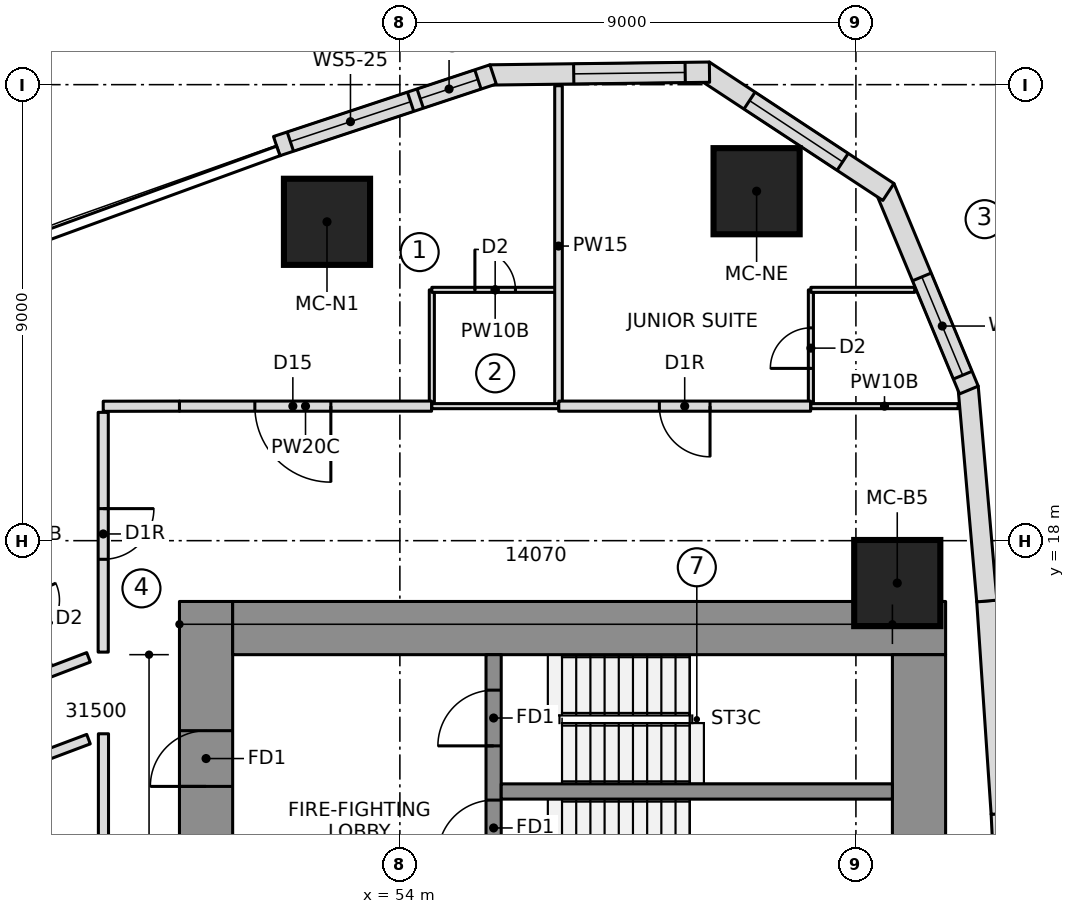
"""IFC4 building model, lengths in metres.
Left out: names, types, materials, properties, quantities, classifications, styles, units other than length and angle.
Written with IfcOpenShell. Run it as: python <this file> out.ifc"""

import sys

from ifc_helpers import new_model, si_unit, direction, frame, frame_2d, origin, origin_2d, place, context, subcontext, project, spatial, polyline, rectangle, outline, extrude, element, fill, save


model = new_model("IFC4")
c1 = context("Model", 3, precision=1e-05, world=origin(), true_north=direction((0.0, 1.0)))
c2 = subcontext(c1, "Body", "Model", "MODEL_VIEW")
j1 = project(units=[si_unit("LENGTHUNIT", "METRE"), si_unit("PLANEANGLEUNIT", "RADIAN")], contexts=[c1])
p1 = place(None, origin())
s1 = spatial("IfcSite", under=j1, at=p1, CompositionType="ELEMENT")
p2 = place(p1, origin())
s2 = spatial("IfcBuilding", under=s1, at=p2, CompositionType="ELEMENT")
p3 = place(p2, frame((0.0, 0.0, 102.65)))
s3 = spatial("IfcBuildingStorey", under=s2, at=p3, CompositionType="ELEMENT", Elevation=102.65)
p4 = place(p3, frame((50.175, 6.65, 0.0), z_axis=(0.0, 0.0, 1.0), x_axis=(0.0, 1.0, 0.0)))
e1 = element("IfcWall", 1, at=p4, inside=s3, PredefinedType="SHEAR", context=c2, shape_type="SweptSolid", body=[
    extrude(rectangle(XDim=10.15, YDim=1.05, at=frame_2d((5.075, 0.0))), origin(), (0.0, 0.0, 1.0), 3.55),
])
p5 = place(p4, frame((6.5, 0.0, 0.0)))
e2 = element("IfcOpeningElement", 2, at=p5, cuts=e1, PredefinedType="OPENING", context=c2, shape_type="SweptSolid", body=[
    extrude(rectangle(XDim=1.1, YDim=2.1, at=frame_2d((0.55, 1.05))), frame((0.0, 0.535, 0.0), z_axis=(0.0, -1.0, 0.0), x_axis=(1.0, 0.0, 0.0)), (0.0, 0.0, 1.0), 1.07),
])
p6 = place(p3, frame((50.7, 16.275, 0.0), z_axis=(0.0, 0.0, 1.0), x_axis=(1.0, 0.0, 0.0)))
e3 = element("IfcWall", 3, at=p6, inside=s3, PredefinedType="SHEAR", context=c2, shape_type="SweptSolid", body=[
    extrude(rectangle(XDim=14.07, YDim=1.05, at=frame_2d((7.035, 0.0))), origin(), (0.0, 0.0, 1.0), 3.55),
])
p7 = place(p3, frame((64.245, 9.389, 0.0), z_axis=(0.0, 0.0, 1.0), x_axis=(0.0, 1.0, 0.0)))
e4 = element("IfcWall", 4, at=p7, inside=s3, PredefinedType="SHEAR", context=c2, shape_type="SweptSolid", body=[
    extrude(rectangle(XDim=6.361, YDim=1.05, at=frame_2d((3.181, 0.0))), origin(), (0.0, 0.0, 1.0), 3.55),
])
p8 = place(p3, frame((55.85, 10.35, 0.0), z_axis=(0.0, 0.0, 1.0), x_axis=(0.0, 1.0, 0.0)))
e5 = element("IfcWall", 5, at=p8, inside=s3, PredefinedType="SHEAR", context=c2, shape_type="SweptSolid", body=[
    extrude(rectangle(XDim=5.4, YDim=0.3, at=frame_2d((2.7, 0.0))), origin(), (0.0, 0.0, 1.0), 3.55),
])
p9 = place(p8, frame((1.43, 0.0, 0.0)))
e6 = element("IfcOpeningElement", 6, at=p9, cuts=e5, PredefinedType="OPENING", context=c2, shape_type="SweptSolid", body=[
    extrude(rectangle(XDim=1.1, YDim=2.1, at=frame_2d((0.55, 1.05))), frame((0.0, 0.16, 0.0), z_axis=(0.0, -1.0, 0.0), x_axis=(1.0, 0.0, 0.0)), (0.0, 0.0, 1.0), 0.32),
])
p10 = place(p8, frame((3.6, 0.0, 0.0)))
e7 = element("IfcOpeningElement", 7, at=p10, cuts=e5, PredefinedType="OPENING", context=c2, shape_type="SweptSolid", body=[
    extrude(rectangle(XDim=1.1, YDim=2.1, at=frame_2d((0.55, 1.05))), frame((0.0, 0.16, 0.0), z_axis=(0.0, -1.0, 0.0), x_axis=(1.0, 0.0, 0.0)), (0.0, 0.0, 1.0), 0.32),
])
p11 = place(p3, frame((56.0, 13.05, 0.0), z_axis=(0.0, 0.0, 1.0), x_axis=(1.0, 0.0, 0.0)))
e8 = element("IfcWall", 8, at=p11, inside=s3, PredefinedType="SHEAR", context=c2, shape_type="SweptSolid", body=[
    extrude(rectangle(XDim=7.72, YDim=0.3, at=frame_2d((3.86, 0.0))), origin(), (0.0, 0.0, 1.0), 3.55),
])
for number, where, z_axis, x_axis in (
    (9, (63.816, 17.164, 0.0), (0.0, 0.0, 1.0), (1.0, 0.0, 0.0)),
    (10, (61.04, 24.897, 0.0), (0.0, 0.0, 1.0), (1.0, 0.0, 0.0)),
    (11, (52.562, 24.293, 0.0), (0.0, 0.0, 1.0), (1.0, 0.0, 0.0)),
):
    element("IfcColumn", number, at=place(p3, frame(where, z_axis=z_axis, x_axis=x_axis)), inside=s3, PredefinedType="COLUMN", context=c2, shape_type="SweptSolid", body=[
        extrude(rectangle(XDim=1.7, YDim=1.7, at=origin_2d()), origin(), (0.0, 0.0, 1.0), 3.55),
    ])
p12 = place(p3, frame((66.072, 8.412, 0.0), z_axis=(0.0, 0.0, 1.0), x_axis=(-0.048342691508, 0.998830808585, 0.0)))
e12 = element("IfcWall", 12, at=p12, inside=s3, PredefinedType="NOTDEFINED", context=c2, shape_type="SweptSolid", body=[
    extrude(outline(polyline([(-0.002, -0.2), (4.209, -0.2), (4.205, 0.2), (0.002, 0.2), (-0.002, -0.2)])), origin(), (0.0, 0.0, 1.0), 3.25),
])
p13 = place(p3, frame((65.868, 12.614, 0.0), z_axis=(0.0, 0.0, 1.0), x_axis=(-0.067724559895, 0.997704056315, 0.0)))
e13 = element("IfcWall", 13, at=p13, inside=s3, PredefinedType="NOTDEFINED", context=c2, shape_type="SweptSolid", body=[
    extrude(outline(polyline([(-0.002, -0.2), (4.209, -0.2), (4.205, 0.2), (0.002, 0.2), (-0.002, -0.2)])), origin(), (0.0, 0.0, 1.0), 3.25),
])
p14 = place(p3, frame((65.583, 16.811, 0.0), z_axis=(0.0, 0.0, 1.0), x_axis=(-0.086992730434, 0.996208946382, 0.0)))
e14 = element("IfcWall", 14, at=p14, inside=s3, PredefinedType="NOTDEFINED", context=c2, shape_type="SweptSolid", body=[
    extrude(outline(polyline([(-0.002, -0.2), (4.238, -0.2), (4.176, 0.2), (0.002, 0.2), (-0.002, -0.2)])), origin(), (0.0, 0.0, 1.0), 3.25),
])
p15 = place(p3, frame((65.217, 21.002, 0.0), z_axis=(0.0, 0.0, 1.0), x_axis=(-0.383997751971, 0.923334027577, 0.0)))
e15 = element("IfcWall", 15, at=p15, inside=s3, PredefinedType="NOTDEFINED", context=c2, shape_type="SweptSolid", body=[
    extrude(outline(polyline([(-0.031, -0.2), (4.3, -0.2), (4.177, 0.2), (0.031, 0.2), (-0.031, -0.2)])), origin(), (0.0, 0.0, 1.0), 3.25),
])
p16 = place(p15, frame((0.287, 0.0, 0.6)))
e16 = element("IfcOpeningElement", 16, at=p16, cuts=e15, PredefinedType="OPENING", context=c2, shape_type="SweptSolid", body=[
    extrude(outline(polyline([(0.0, 1.4), (0.08, 1.802), (0.308, 2.142), (0.648, 2.37), (1.05, 2.45), (1.452, 2.37), (1.792, 2.142), (2.02, 1.802), (2.1, 1.4), (2.1, 1.05), (2.02, 0.648), (1.792, 0.308), (1.452, 0.08), (1.05, 0.0), (0.648, 0.08), (0.308, 0.308), (0.08, 0.648), (0.0, 1.05), (0.0, 1.4)])), frame((0.0, 0.21, 0.0), z_axis=(0.0, -1.0, 0.0), x_axis=(1.0, 0.0, 0.0)), (0.0, 0.0, 1.0), 0.42),
])
p17 = place(p3, frame((63.59, 24.916, 0.0), z_axis=(0.0, 0.0, 1.0), x_axis=(-0.835340523653, 0.549732852887, 0.0)))
e17 = element("IfcWall", 17, at=p17, inside=s3, PredefinedType="NOTDEFINED", context=c2, shape_type="SweptSolid", body=[
    extrude(outline(polyline([(-0.061, -0.2), (4.3, -0.2), (4.178, 0.2), (0.061, 0.2), (-0.061, -0.2)])), origin(), (0.0, 0.0, 1.0), 3.25),
])
p18 = place(p17, frame((1.02, 0.0, 0.6)))
e18 = element("IfcOpeningElement", 18, at=p18, cuts=e17, PredefinedType="OPENING", context=c2, shape_type="SweptSolid", body=[
    extrude(outline(polyline([(0.0, 1.35), (0.084, 1.771), (0.322, 2.128), (0.679, 2.366), (1.1, 2.45), (1.521, 2.366), (1.878, 2.128), (2.116, 1.771), (2.2, 1.35), (2.2, 1.1), (2.116, 0.679), (1.878, 0.322), (1.521, 0.084), (1.1, 0.0), (0.679, 0.084), (0.322, 0.322), (0.084, 0.679), (0.0, 1.1), (0.0, 1.35)])), frame((0.0, 0.21, 0.0), z_axis=(0.0, -1.0, 0.0), x_axis=(1.0, 0.0, 0.0)), (0.0, 0.0, 1.0), 0.42),
])
p19 = place(p3, frame((60.049, 27.246, 0.0), z_axis=(0.0, 0.0, 1.0), x_axis=(-0.999919718849, -0.012671063772, 0.0)))
e19 = element("IfcWall", 19, at=p19, inside=s3, PredefinedType="NOTDEFINED", context=c2, shape_type="SweptSolid", body=[
    extrude(outline(polyline([(-0.061, -0.2), (4.27, -0.2), (4.208, 0.2), (0.061, 0.2), (-0.061, -0.2)])), origin(), (0.0, 0.0, 1.0), 3.25),
])
p20 = place(p19, frame((0.418, 0.0, 0.6)))
e20 = element("IfcOpeningElement", 20, at=p20, cuts=e19, PredefinedType="OPENING", context=c2, shape_type="SweptSolid", body=[
    extrude(outline(polyline([(0.0, 1.35), (0.084, 1.771), (0.322, 2.128), (0.679, 2.366), (1.1, 2.45), (1.521, 2.366), (1.878, 2.128), (2.116, 1.771), (2.2, 1.35), (2.2, 1.1), (2.116, 0.679), (1.878, 0.322), (1.521, 0.084), (1.1, 0.0), (0.679, 0.084), (0.322, 0.322), (0.084, 0.679), (0.0, 1.1), (0.0, 1.35)])), frame((0.0, 0.21, 0.0), z_axis=(0.0, -1.0, 0.0), x_axis=(1.0, 0.0, 0.0)), (0.0, 0.0, 1.0), 0.42),
])
p21 = place(p3, frame((55.81, 27.192, 0.0), z_axis=(0.0, 0.0, 1.0), x_axis=(-0.94925004851, -0.314522408429, 0.0)))
e21 = element("IfcWall", 21, at=p21, inside=s3, PredefinedType="NOTDEFINED", context=c2, shape_type="SweptSolid", body=[
    extrude(outline(polyline([(-0.031, -0.2), (4.468, -0.2), (4.468, 0.2), (0.031, 0.2), (-0.031, -0.2)])), origin(), (0.0, 0.0, 1.0), 3.25),
])
p22 = place(p21, frame((0.284, 0.0, 0.9)))
e22 = element("IfcOpeningElement", 22, at=p22, cuts=e21, PredefinedType="OPENING", context=c2, shape_type="SweptSolid", body=[
    extrude(rectangle(XDim=1.2, YDim=1.8, at=frame_2d((0.6, 0.9))), frame((0.0, 0.21, 0.0), z_axis=(0.0, -1.0, 0.0), x_axis=(1.0, 0.0, 0.0)), (0.0, 0.0, 1.0), 0.42),
])
p23 = place(p21, frame((1.684, 0.0, 0.9)))
e23 = element("IfcOpeningElement", 23, at=p23, cuts=e21, PredefinedType="OPENING", context=c2, shape_type="SweptSolid", body=[
    extrude(rectangle(XDim=2.5, YDim=1.8, at=frame_2d((1.25, 0.9))), frame((0.0, 0.21, 0.0), z_axis=(0.0, -1.0, 0.0), x_axis=(1.0, 0.0, 0.0)), (0.0, 0.0, 1.0), 0.42),
])
p24 = place(p3, frame((54.631, 20.65, 0.0), z_axis=(0.0, 0.0, 1.0), x_axis=(0.0, 1.0, 0.0)))
e24 = element("IfcWall", 24, at=p24, inside=s3, PredefinedType="PARTITIONING", context=c2, shape_type="SweptSolid", body=[
    extrude(rectangle(XDim=2.3, YDim=0.1, at=frame_2d((1.15, 0.0))), origin(), (0.0, 0.0, 1.0), 3.25),
])
p25 = place(p3, frame((54.631, 22.95, 0.0), z_axis=(0.0, 0.0, 1.0), x_axis=(1.0, 0.0, 0.0)))
e25 = element("IfcWall", 25, at=p25, inside=s3, PredefinedType="PARTITIONING", context=c2, shape_type="SweptSolid", body=[
    extrude(rectangle(XDim=2.5, YDim=0.1, at=frame_2d((1.25, 0.0))), origin(), (0.0, 0.0, 1.0), 3.25),
])
p26 = place(p25, frame((0.85, 0.0, 0.0)))
e26 = element("IfcOpeningElement", 26, at=p26, cuts=e25, PredefinedType="OPENING", context=c2, shape_type="SweptSolid", body=[
    extrude(rectangle(XDim=0.8, YDim=2.1, at=frame_2d((0.4, 1.05))), frame((0.0, 0.06, 0.0), z_axis=(0.0, -1.0, 0.0), x_axis=(1.0, 0.0, 0.0)), (0.0, 0.0, 1.0), 0.12),
])
p27 = place(p3, frame((62.111, 20.65, 0.0), z_axis=(0.0, 0.0, 1.0), x_axis=(0.0, 1.0, 0.0)))
e27 = element("IfcWall", 27, at=p27, inside=s3, PredefinedType="PARTITIONING", context=c2, shape_type="SweptSolid", body=[
    extrude(rectangle(XDim=2.3, YDim=0.1, at=frame_2d((1.15, 0.0))), origin(), (0.0, 0.0, 1.0), 3.25),
])
p28 = place(p27, frame((0.75, 0.0, 0.0)))
e28 = element("IfcOpeningElement", 28, at=p28, cuts=e27, PredefinedType="OPENING", context=c2, shape_type="SweptSolid", body=[
    extrude(rectangle(XDim=0.8, YDim=2.1, at=frame_2d((0.4, 1.05))), frame((0.0, 0.06, 0.0), z_axis=(0.0, -1.0, 0.0), x_axis=(1.0, 0.0, 0.0)), (0.0, 0.0, 1.0), 0.12),
])
p29 = place(p3, frame((62.111, 22.95, 0.0), z_axis=(0.0, 0.0, 1.0), x_axis=(1.0, 0.0, 0.0)))
e29 = element("IfcWall", 29, at=p29, inside=s3, PredefinedType="PARTITIONING", context=c2, shape_type="SweptSolid", body=[
    extrude(rectangle(XDim=2.049, YDim=0.1, at=frame_2d((1.025, 0.0))), origin(), (0.0, 0.0, 1.0), 3.25),
])
p30 = place(p3, frame((57.131, 20.65, 0.0), z_axis=(0.0, 0.0, 1.0), x_axis=(0.0, 1.0, 0.0)))
e30 = element("IfcWall", 30, at=p30, inside=s3, PredefinedType="PARTITIONING", context=c2, shape_type="SweptSolid", body=[
    extrude(rectangle(XDim=6.329, YDim=0.15, at=frame_2d((3.165, 0.0))), origin(), (0.0, 0.0, 1.0), 3.25),
])
p31 = place(p3, frame((46.169, 17.509, 0.0), z_axis=(0.0, 0.0, 1.0), x_axis=(0.417409478396, -0.90871850831, 0.0)))
e31 = element("IfcWall", 31, at=p31, inside=s3, PredefinedType="PARTITIONING", context=c2, shape_type="SweptSolid", body=[
    extrude(rectangle(XDim=2.283, YDim=0.1, at=frame_2d((1.142, 0.0))), origin(), (0.0, 0.0, 1.0), 3.25),
])
p32 = place(p31, frame((0.75, 0.0, 0.0)))
e32 = element("IfcOpeningElement", 32, at=p32, cuts=e31, PredefinedType="OPENING", context=c2, shape_type="SweptSolid", body=[
    extrude(rectangle(XDim=0.8, YDim=2.1, at=frame_2d((0.4, 1.05))), frame((0.0, 0.06, 0.0), z_axis=(0.0, -1.0, 0.0), x_axis=(1.0, 0.0, 0.0)), (0.0, 0.0, 1.0), 0.12),
])
p33 = place(p3, frame((54.625, 20.655, 0.0), z_axis=(0.0, 0.0, 1.0), x_axis=(-1.0, 0.0, 0.0)))
e33 = element("IfcWall", 33, at=p33, inside=s3, PredefinedType="PARTITIONING", context=c2, shape_type="SweptSolid", body=[
    extrude(rectangle(XDim=4.976, YDim=0.2, at=frame_2d((2.488, 0.0))), origin(), (0.0, 0.0, 1.0), 3.25),
])
p34 = place(p33, frame((1.988, 0.0, 0.0)))
e34 = element("IfcOpeningElement", 34, at=p34, cuts=e33, PredefinedType="OPENING", context=c2, shape_type="SweptSolid", body=[
    extrude(rectangle(XDim=1.5, YDim=2.1, at=frame_2d((0.75, 1.05))), frame((0.0, 0.11, 0.0), z_axis=(0.0, -1.0, 0.0), x_axis=(1.0, 0.0, 0.0)), (0.0, 0.0, 1.0), 0.22),
])
p35 = place(p3, frame((62.106, 20.655, 0.0), z_axis=(0.0, 0.0, 1.0), x_axis=(-1.0, 0.0, 0.0)))
e35 = element("IfcWall", 35, at=p35, inside=s3, PredefinedType="PARTITIONING", context=c2, shape_type="SweptSolid", body=[
    extrude(rectangle(XDim=4.971, YDim=0.2, at=frame_2d((2.485, 0.0))), origin(), (0.0, 0.0, 1.0), 3.25),
])
p36 = place(p35, frame((1.985, 0.0, 0.0)))
e36 = element("IfcOpeningElement", 36, at=p36, cuts=e35, PredefinedType="OPENING", context=c2, shape_type="SweptSolid", body=[
    extrude(rectangle(XDim=1.0, YDim=2.1, at=frame_2d((0.5, 1.05))), frame((0.0, 0.11, 0.0), z_axis=(0.0, -1.0, 0.0), x_axis=(1.0, 0.0, 0.0)), (0.0, 0.0, 1.0), 0.22),
])
p37 = place(p3, frame((57.131, 20.655, 0.0), z_axis=(0.0, 0.0, 1.0), x_axis=(-1.0, 0.0, 0.0)))
e37 = element("IfcWall", 37, at=p37, inside=s3, PredefinedType="PARTITIONING", context=c2, shape_type="SweptSolid", body=[
    extrude(rectangle(XDim=2.5, YDim=0.1, at=frame_2d((1.25, 0.0))), origin(), (0.0, 0.0, 1.0), 3.25),
])
p38 = place(p3, frame((65.017, 20.655, 0.0), z_axis=(0.0, 0.0, 1.0), x_axis=(-1.0, 0.0, 0.0)))
e38 = element("IfcWall", 38, at=p38, inside=s3, PredefinedType="PARTITIONING", context=c2, shape_type="SweptSolid", body=[
    extrude(rectangle(XDim=2.906, YDim=0.1, at=frame_2d((1.453, 0.0))), origin(), (0.0, 0.0, 1.0), 3.25),
])
p39 = place(p3, frame((47.855, 15.698, 0.0), z_axis=(0.0, 0.0, 1.0), x_axis=(-0.934199537442, -0.35675092746, 0.0)))
e39 = element("IfcWall", 39, at=p39, inside=s3, PredefinedType="PARTITIONING", context=c2, shape_type="SweptSolid", body=[
    extrude(rectangle(XDim=2.982, YDim=0.2, at=frame_2d((1.491, 0.0))), origin(), (0.0, 0.0, 1.0), 3.25),
])
p40 = place(p3, frame((46.696, 13.647, 0.0), z_axis=(0.0, 0.0, 1.0), x_axis=(0.935907269358, 0.352246480696, 0.0)))
e40 = element("IfcWall", 40, at=p40, inside=s3, PredefinedType="PARTITIONING", context=c2, shape_type="SweptSolid", body=[
    extrude(rectangle(XDim=1.239, YDim=0.2, at=frame_2d((0.619, 0.0))), origin(), (0.0, 0.0, 1.0), 3.25),
])
p41 = place(p3, frame((48.15, 14.189, 0.0), z_axis=(0.0, 0.0, 1.0), x_axis=(0.0, -1.0, 0.0)))
e41 = element("IfcWall", 41, at=p41, inside=s3, PredefinedType="PARTITIONING", context=c2, shape_type="SweptSolid", body=[
    extrude(rectangle(XDim=28.377, YDim=0.2, at=frame_2d((14.189, 0.0))), origin(), (0.0, 0.0, 1.0), 3.25),
])
p42 = place(p3, frame((49.65, 20.655, 0.0), z_axis=(0.0, 0.0, 1.0), x_axis=(-0.999998406651, -0.001785131852, 0.0)))
e42 = element("IfcWall", 42, at=p42, inside=s3, PredefinedType="PARTITIONING", context=c2, shape_type="SweptSolid", body=[
    extrude(rectangle(XDim=1.504, YDim=0.2, at=frame_2d((0.752, 0.0))), origin(), (0.0, 0.0, 1.0), 3.25),
])
p43 = place(p3, frame((48.146, 20.532, 0.0), z_axis=(0.0, 0.0, 1.0), x_axis=(-5.1594263e-05, -0.999999998669, 0.0)))
e43 = element("IfcWall", 43, at=p43, inside=s3, PredefinedType="PARTITIONING", context=c2, shape_type="SweptSolid", body=[
    extrude(rectangle(XDim=4.732, YDim=0.2, at=frame_2d((2.366, 0.0))), origin(), (0.0, 0.0, 1.0), 3.25),
])
p44 = place(p43, frame((1.9, 0.0, 0.0)))
e44 = element("IfcOpeningElement", 44, at=p44, cuts=e43, PredefinedType="OPENING", context=c2, shape_type="SweptSolid", body=[
    extrude(rectangle(XDim=1.0, YDim=2.1, at=frame_2d((0.5, 1.05))), frame((0.0, 0.11, 0.0), z_axis=(0.0, -1.0, 0.0), x_axis=(1.0, 0.0, 0.0)), (0.0, 0.0, 1.0), 0.22),
])
p45 = place(p16, origin())
e45 = element("IfcWindow", 45, at=p45, inside=s3, PartitioningType="SINGLE_PANEL", PredefinedType="WINDOW", context=c2, shape_type="SweptSolid", body=[
    extrude(outline(polyline([(0.0, 1.4), (0.08, 1.802), (0.308, 2.142), (0.648, 2.37), (1.05, 2.45), (1.452, 2.37), (1.792, 2.142), (2.02, 1.802), (2.1, 1.4), (2.1, 1.05), (2.02, 0.648), (1.792, 0.308), (1.452, 0.08), (1.05, 0.0), (0.648, 0.08), (0.308, 0.308), (0.08, 0.648), (0.0, 1.05), (0.0, 1.4)])), frame((0.0, 0.17, 0.0), z_axis=(0.0, -1.0, 0.0), x_axis=(1.0, 0.0, 0.0)), (0.0, 0.0, 1.0), 0.06),
])
fill(e16, e45)
p46 = place(p18, origin())
e46 = element("IfcWindow", 46, at=p46, inside=s3, PartitioningType="SINGLE_PANEL", PredefinedType="WINDOW", context=c2, shape_type="SweptSolid", body=[
    extrude(outline(polyline([(0.0, 1.35), (0.084, 1.771), (0.322, 2.128), (0.679, 2.366), (1.1, 2.45), (1.521, 2.366), (1.878, 2.128), (2.116, 1.771), (2.2, 1.35), (2.2, 1.1), (2.116, 0.679), (1.878, 0.322), (1.521, 0.084), (1.1, 0.0), (0.679, 0.084), (0.322, 0.322), (0.084, 0.679), (0.0, 1.1), (0.0, 1.35)])), frame((0.0, 0.17, 0.0), z_axis=(0.0, -1.0, 0.0), x_axis=(1.0, 0.0, 0.0)), (0.0, 0.0, 1.0), 0.06),
])
fill(e18, e46)
p47 = place(p20, origin())
e47 = element("IfcWindow", 47, at=p47, inside=s3, PartitioningType="SINGLE_PANEL", PredefinedType="WINDOW", context=c2, shape_type="SweptSolid", body=[
    extrude(outline(polyline([(0.0, 1.35), (0.084, 1.771), (0.322, 2.128), (0.679, 2.366), (1.1, 2.45), (1.521, 2.366), (1.878, 2.128), (2.116, 1.771), (2.2, 1.35), (2.2, 1.1), (2.116, 0.679), (1.878, 0.322), (1.521, 0.084), (1.1, 0.0), (0.679, 0.084), (0.322, 0.322), (0.084, 0.679), (0.0, 1.1), (0.0, 1.35)])), frame((0.0, 0.17, 0.0), z_axis=(0.0, -1.0, 0.0), x_axis=(1.0, 0.0, 0.0)), (0.0, 0.0, 1.0), 0.06),
])
fill(e20, e47)
p48 = place(p22, origin())
e48 = element("IfcWindow", 48, at=p48, inside=s3, PartitioningType="SINGLE_PANEL", PredefinedType="WINDOW", context=c2, shape_type="SweptSolid", body=[
    extrude(rectangle(XDim=1.2, YDim=1.8, at=frame_2d((0.6, 0.9))), frame((0.0, 0.17, 0.0), z_axis=(0.0, -1.0, 0.0), x_axis=(1.0, 0.0, 0.0)), (0.0, 0.0, 1.0), 0.06),
])
fill(e22, e48)
p49 = place(p23, origin())
e49 = element("IfcWindow", 49, at=p49, inside=s3, PartitioningType="SINGLE_PANEL", PredefinedType="WINDOW", context=c2, shape_type="SweptSolid", body=[
    extrude(rectangle(XDim=2.5, YDim=1.8, at=frame_2d((1.25, 0.9))), frame((0.0, 0.17, 0.0), z_axis=(0.0, -1.0, 0.0), x_axis=(1.0, 0.0, 0.0)), (0.0, 0.0, 1.0), 0.06),
])
fill(e23, e49)
p50 = place(p26, origin())
e50 = element("IfcDoor", 50, at=p50, inside=s3, OperationType="SINGLE_SWING_LEFT", PredefinedType="DOOR", context=c2, shape_type="SweptSolid", body=[
    extrude(rectangle(XDim=0.8, YDim=2.1, at=frame_2d((0.4, 1.05))), frame((0.0, 0.025, 0.0), z_axis=(0.0, -1.0, 0.0), x_axis=(1.0, 0.0, 0.0)), (0.0, 0.0, 1.0), 0.05),
])
fill(e26, e50)
p51 = place(p28, origin())
e51 = element("IfcDoor", 51, at=p51, inside=s3, OperationType="SINGLE_SWING_LEFT", PredefinedType="DOOR", context=c2, shape_type="SweptSolid", body=[
    extrude(rectangle(XDim=0.8, YDim=2.1, at=frame_2d((0.4, 1.05))), frame((0.0, 0.025, 0.0), z_axis=(0.0, -1.0, 0.0), x_axis=(1.0, 0.0, 0.0)), (0.0, 0.0, 1.0), 0.05),
])
fill(e28, e51)
p52 = place(p34, origin())
e52 = element("IfcDoor", 52, at=p52, inside=s3, OperationType="DOUBLE_DOOR_SINGLE_SWING", PredefinedType="DOOR", context=c2, shape_type="SweptSolid", body=[
    extrude(rectangle(XDim=1.5, YDim=2.1, at=frame_2d((0.75, 1.05))), frame((0.0, 0.025, 0.0), z_axis=(0.0, -1.0, 0.0), x_axis=(1.0, 0.0, 0.0)), (0.0, 0.0, 1.0), 0.05),
])
fill(e34, e52)
p53 = place(p36, origin())
e53 = element("IfcDoor", 53, at=p53, inside=s3, OperationType="SINGLE_SWING_RIGHT", PredefinedType="DOOR", context=c2, shape_type="SweptSolid", body=[
    extrude(rectangle(XDim=1.0, YDim=2.1, at=frame_2d((0.5, 1.05))), frame((0.0, 0.025, 0.0), z_axis=(0.0, -1.0, 0.0), x_axis=(1.0, 0.0, 0.0)), (0.0, 0.0, 1.0), 0.05),
])
fill(e36, e53)
p54 = place(p44, origin())
e54 = element("IfcDoor", 54, at=p54, inside=s3, OperationType="SINGLE_SWING_RIGHT", PredefinedType="DOOR", context=c2, shape_type="SweptSolid", body=[
    extrude(rectangle(XDim=1.0, YDim=2.1, at=frame_2d((0.5, 1.05))), frame((0.0, 0.025, 0.0), z_axis=(0.0, -1.0, 0.0), x_axis=(1.0, 0.0, 0.0)), (0.0, 0.0, 1.0), 0.05),
])
fill(e44, e54)
p55 = place(p9, origin())
e55 = element("IfcDoor", 55, at=p55, inside=s3, OperationType="SINGLE_SWING_RIGHT", PredefinedType="DOOR", context=c2, shape_type="SweptSolid", body=[
    extrude(rectangle(XDim=1.1, YDim=2.1, at=frame_2d((0.55, 1.05))), frame((0.0, 0.025, 0.0), z_axis=(0.0, -1.0, 0.0), x_axis=(1.0, 0.0, 0.0)), (0.0, 0.0, 1.0), 0.05),
])
fill(e6, e55)
p56 = place(p10, origin())
e56 = element("IfcDoor", 56, at=p56, inside=s3, OperationType="SINGLE_SWING_RIGHT", PredefinedType="DOOR", context=c2, shape_type="SweptSolid", body=[
    extrude(rectangle(XDim=1.1, YDim=2.1, at=frame_2d((0.55, 1.05))), frame((0.0, 0.025, 0.0), z_axis=(0.0, -1.0, 0.0), x_axis=(1.0, 0.0, 0.0)), (0.0, 0.0, 1.0), 0.05),
])
fill(e7, e56)
p57 = place(p5, origin())
e57 = element("IfcDoor", 57, at=p57, inside=s3, OperationType="SINGLE_SWING_RIGHT", PredefinedType="DOOR", context=c2, shape_type="SweptSolid", body=[
    extrude(rectangle(XDim=1.1, YDim=2.1, at=frame_2d((0.55, 1.05))), frame((0.0, 0.025, 0.0), z_axis=(0.0, -1.0, 0.0), x_axis=(1.0, 0.0, 0.0)), (0.0, 0.0, 1.0), 0.05),
])
fill(e2, e57)
save(model, sys.argv[1])
